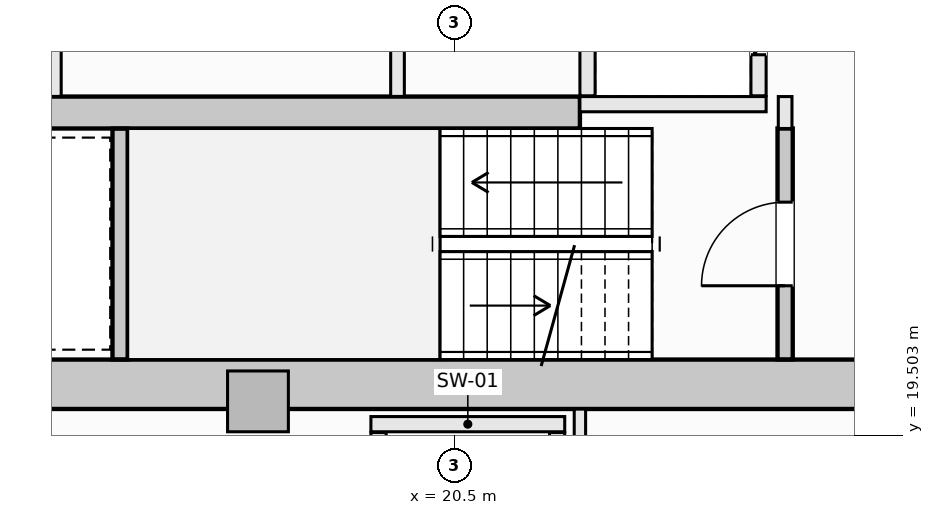
"""IFC4 building model, lengths in metres.
Left out: names, types, materials, properties, quantities, classifications, styles, units other than length and angle.
Written with IfcOpenShell. Run it as: python <this file> out.ifc"""

import sys

from ifc_helpers import new_model, si_unit, direction, frame, frame_2d, origin, origin_2d, place, context, subcontext, project, spatial, rectangle, extrude, element, fill, save


model = new_model("IFC4")
c1 = context("Model", 3, precision=1e-05, world=origin(), true_north=direction((0.0, 1.0)))
c2 = subcontext(c1, "Body", "Model", "MODEL_VIEW")
j1 = project(units=[si_unit("LENGTHUNIT", "METRE"), si_unit("PLANEANGLEUNIT", "RADIAN")], contexts=[c1])
p1 = place(None, origin())
s1 = spatial("IfcSite", under=j1, at=p1, CompositionType="ELEMENT")
p2 = place(p1, origin())
s2 = spatial("IfcBuilding", under=s1, at=p2, CompositionType="ELEMENT")
p3 = place(p2, frame((0.0, 0.0, 132.5)))
s3 = spatial("IfcBuildingStorey", under=s2, at=p3, CompositionType="ELEMENT", Elevation=132.5)
p4 = place(p3, frame((14.175, 20.175, -0.27), z_axis=(0.0, 0.0, 1.0), x_axis=(1.0, 0.0, 0.0)))
e1 = element("IfcWall", 1, at=p4, inside=s3, PredefinedType="SHEAR", context=c2, shape_type="SweptSolid", body=[
    extrude(rectangle(XDim=13.65, YDim=0.65, at=frame_2d((6.825, 0.0))), origin(), (0.0, 0.0, 1.0), 3.4),
])
p5 = place(p3, frame((14.85, 23.75, -0.27), z_axis=(0.0, 0.0, 1.0), x_axis=(1.0, 0.0, 0.0)))
e2 = element("IfcWall", 2, at=p5, inside=s3, PredefinedType="SHEAR", context=c2, shape_type="SweptSolid", body=[
    extrude(rectangle(XDim=7.3, YDim=0.42, at=frame_2d((3.65, 0.0))), origin(), (0.0, 0.0, 1.0), 3.4),
])
p6 = place(p3, frame((17.914, 19.95, -0.27), z_axis=(0.0, 0.0, 1.0), x_axis=(1.0, 0.0, 0.0)))
e3 = element("IfcColumn", 3, at=p6, inside=s3, PredefinedType="PILASTER", context=c2, shape_type="SweptSolid", body=[
    extrude(rectangle(XDim=0.8, YDim=0.8, at=origin_2d()), origin(), (0.0, 0.0, 1.0), 3.4),
])
p7 = place(p3, frame((24.85, 20.502, -0.27), z_axis=(0.0, 0.0, 1.0), x_axis=(0.0, 1.0, 0.0)))
e4 = element("IfcWall", 4, at=p7, inside=s3, PredefinedType="SHEAR", context=c2, shape_type="SweptSolid", body=[
    extrude(rectangle(XDim=3.038, YDim=0.2, at=frame_2d((1.519, 0.0))), origin(), (0.0, 0.0, 1.0), 3.4),
])
p8 = place(p7, frame((0.969, 0.0, 0.27)))
e5 = element("IfcOpeningElement", 5, at=p8, cuts=e4, PredefinedType="OPENING", context=c2, shape_type="SweptSolid", body=[
    extrude(rectangle(XDim=1.1, YDim=2.15, at=frame_2d((0.55, 1.075))), frame((0.0, 0.11, 0.0), z_axis=(0.0, -1.0, 0.0), x_axis=(1.0, 0.0, 0.0)), (0.0, 0.0, 1.0), 0.22),
])
p9 = place(p3, frame((16.1, 20.502, -0.27), z_axis=(0.0, 0.0, 1.0), x_axis=(0.0, 1.0, 0.0)))
e6 = element("IfcWall", 6, at=p9, inside=s3, PredefinedType="SHEAR", context=c2, shape_type="SweptSolid", body=[
    extrude(rectangle(XDim=3.036, YDim=0.2, at=frame_2d((1.518, 0.0))), origin(), (0.0, 0.0, 1.0), 3.4),
])
p10 = place(p3, frame((22.15, 23.86, 0.0), z_axis=(0.0, 0.0, 1.0), x_axis=(1.0, 0.0, 0.0)))
e7 = element("IfcWall", 7, at=p10, inside=s3, PredefinedType="SOLIDWALL", context=c2, shape_type="SweptSolid", body=[
    extrude(rectangle(XDim=2.45, YDim=0.2, at=frame_2d((1.225, 0.0))), origin(), (0.0, 0.0, 1.0), 3.13),
])
p11 = place(p3, frame((22.25, 23.97, 0.0), z_axis=(0.0, 0.0, 1.0), x_axis=(0.0, 1.0, 0.0)))
e8 = element("IfcWall", 8, at=p11, inside=s3, PredefinedType="SOLIDWALL", context=c2, shape_type="SweptSolid", body=[
    extrude(rectangle(XDim=2.18, YDim=0.2, at=frame_2d((1.09, 0.0))), origin(), (0.0, 0.0, 1.0), 3.13),
])
p12 = place(p3, frame((24.5, 23.97, 0.0), z_axis=(0.0, 0.0, 1.0), x_axis=(0.0, 1.0, 0.0)))
e9 = element("IfcWall", 9, at=p12, inside=s3, PredefinedType="SOLIDWALL", context=c2, shape_type="SweptSolid", body=[
    extrude(rectangle(XDim=2.18, YDim=0.2, at=frame_2d((1.09, 0.0))), origin(), (0.0, 0.0, 1.0), 3.13),
])
p13 = place(p12, frame((0.54, 0.0, 0.0)))
e10 = element("IfcOpeningElement", 10, at=p13, cuts=e9, PredefinedType="OPENING", context=c2, shape_type="SweptSolid", body=[
    extrude(rectangle(XDim=1.1, YDim=2.2, at=frame_2d((0.55, 1.1))), frame((0.0, 0.11, 0.0), z_axis=(0.0, -1.0, 0.0), x_axis=(1.0, 0.0, 0.0)), (0.0, 0.0, 1.0), 0.22),
])
p14 = place(p3, frame((19.4, 19.65, 0.0), z_axis=(0.0, 0.0, 1.0), x_axis=(1.0, 0.0, 0.0)))
e11 = element("IfcWall", 11, at=p14, inside=s3, PredefinedType="SOLIDWALL", context=c2, shape_type="SweptSolid", body=[
    extrude(rectangle(XDim=2.55, YDim=0.2, at=frame_2d((1.275, 0.0))), origin(), (0.0, 0.0, 1.0), 3.13),
])
for number, where, z_axis, x_axis in (
    (12, (19.5, 17.01, 0.0), (0.0, 0.0, 1.0), (0.0, 1.0, 0.0)),
    (13, (21.85, 17.01, 0.0), (0.0, 0.0, 1.0), (0.0, 1.0, 0.0)),
):
    element("IfcWall", number, at=place(p3, frame(where, z_axis=z_axis, x_axis=x_axis)), inside=s3, PredefinedType="SOLIDWALL", context=c2, shape_type="SweptSolid", body=[
        extrude(rectangle(XDim=2.53, YDim=0.2, at=frame_2d((1.265, 0.0))), origin(), (0.0, 0.0, 1.0), 3.13),
    ])
p15 = place(p3, frame((24.85, 23.54, 0.0), z_axis=(0.0, 0.0, 1.0), x_axis=(0.0, 1.0, 0.0)))
e14 = element("IfcWall", 14, at=p15, inside=s3, PredefinedType="SOLIDWALL", context=c2, shape_type="SweptSolid", body=[
    extrude(rectangle(XDim=0.42, YDim=0.18, at=frame_2d((0.21, 0.0))), origin(), (0.0, 0.0, 1.0), 3.13),
])
p16 = place(p3, frame((15.25, 23.962, 0.0), z_axis=(0.0, 0.0, 1.0), x_axis=(0.0, 1.0, 0.0)))
e15 = element("IfcWall", 15, at=p16, inside=s3, PredefinedType="PARTITIONING", context=c2, shape_type="SweptSolid", body=[
    extrude(rectangle(XDim=2.106, YDim=0.15, at=frame_2d((1.053, 0.0))), origin(), (0.0, 0.0, 1.0), 3.13),
])
p17 = place(p3, frame((19.75, 23.962, 0.0), z_axis=(0.0, 0.0, 1.0), x_axis=(0.0, 1.0, 0.0)))
e16 = element("IfcWall", 16, at=p17, inside=s3, PredefinedType="SOLIDWALL", context=c2, shape_type="SweptSolid", body=[
    extrude(rectangle(XDim=2.106, YDim=0.18, at=frame_2d((1.053, 0.0))), origin(), (0.0, 0.0, 1.0), 3.13),
])
p18 = place(p3, frame((22.15, 17.127, 0.0), z_axis=(0.0, 0.0, 1.0), x_axis=(0.0, 1.0, 0.0)))
e17 = element("IfcWall", 17, at=p18, inside=s3, PredefinedType="PARTITIONING", context=c2, shape_type="SweptSolid", body=[
    extrude(rectangle(XDim=2.721, YDim=0.15, at=frame_2d((1.36, 0.0))), origin(), (0.0, 0.0, 1.0), 3.13),
])
p19 = place(p8, origin())
e18 = element("IfcDoor", 18, at=p19, inside=s3, OperationType="SINGLE_SWING_LEFT", PredefinedType="DOOR", context=c2, shape_type="SweptSolid", body=[
    extrude(rectangle(XDim=1.1, YDim=2.15, at=frame_2d((0.55, 1.075))), frame((0.0, 0.025, 0.0), z_axis=(0.0, -1.0, 0.0), x_axis=(1.0, 0.0, 0.0)), (0.0, 0.0, 1.0), 0.05),
])
fill(e5, e18)
p20 = place(p13, origin())
e19 = element("IfcDoor", 19, at=p20, inside=s3, OperationType="SLIDING_TO_LEFT", PredefinedType="DOOR", context=c2, shape_type="SweptSolid", body=[
    extrude(rectangle(XDim=1.1, YDim=2.2, at=frame_2d((0.55, 1.1))), frame((0.0, 0.025, 0.0), z_axis=(0.0, -1.0, 0.0), x_axis=(1.0, 0.0, 0.0)), (0.0, 0.0, 1.0), 0.05),
])
fill(e10, e19)
save(model, sys.argv[1])
